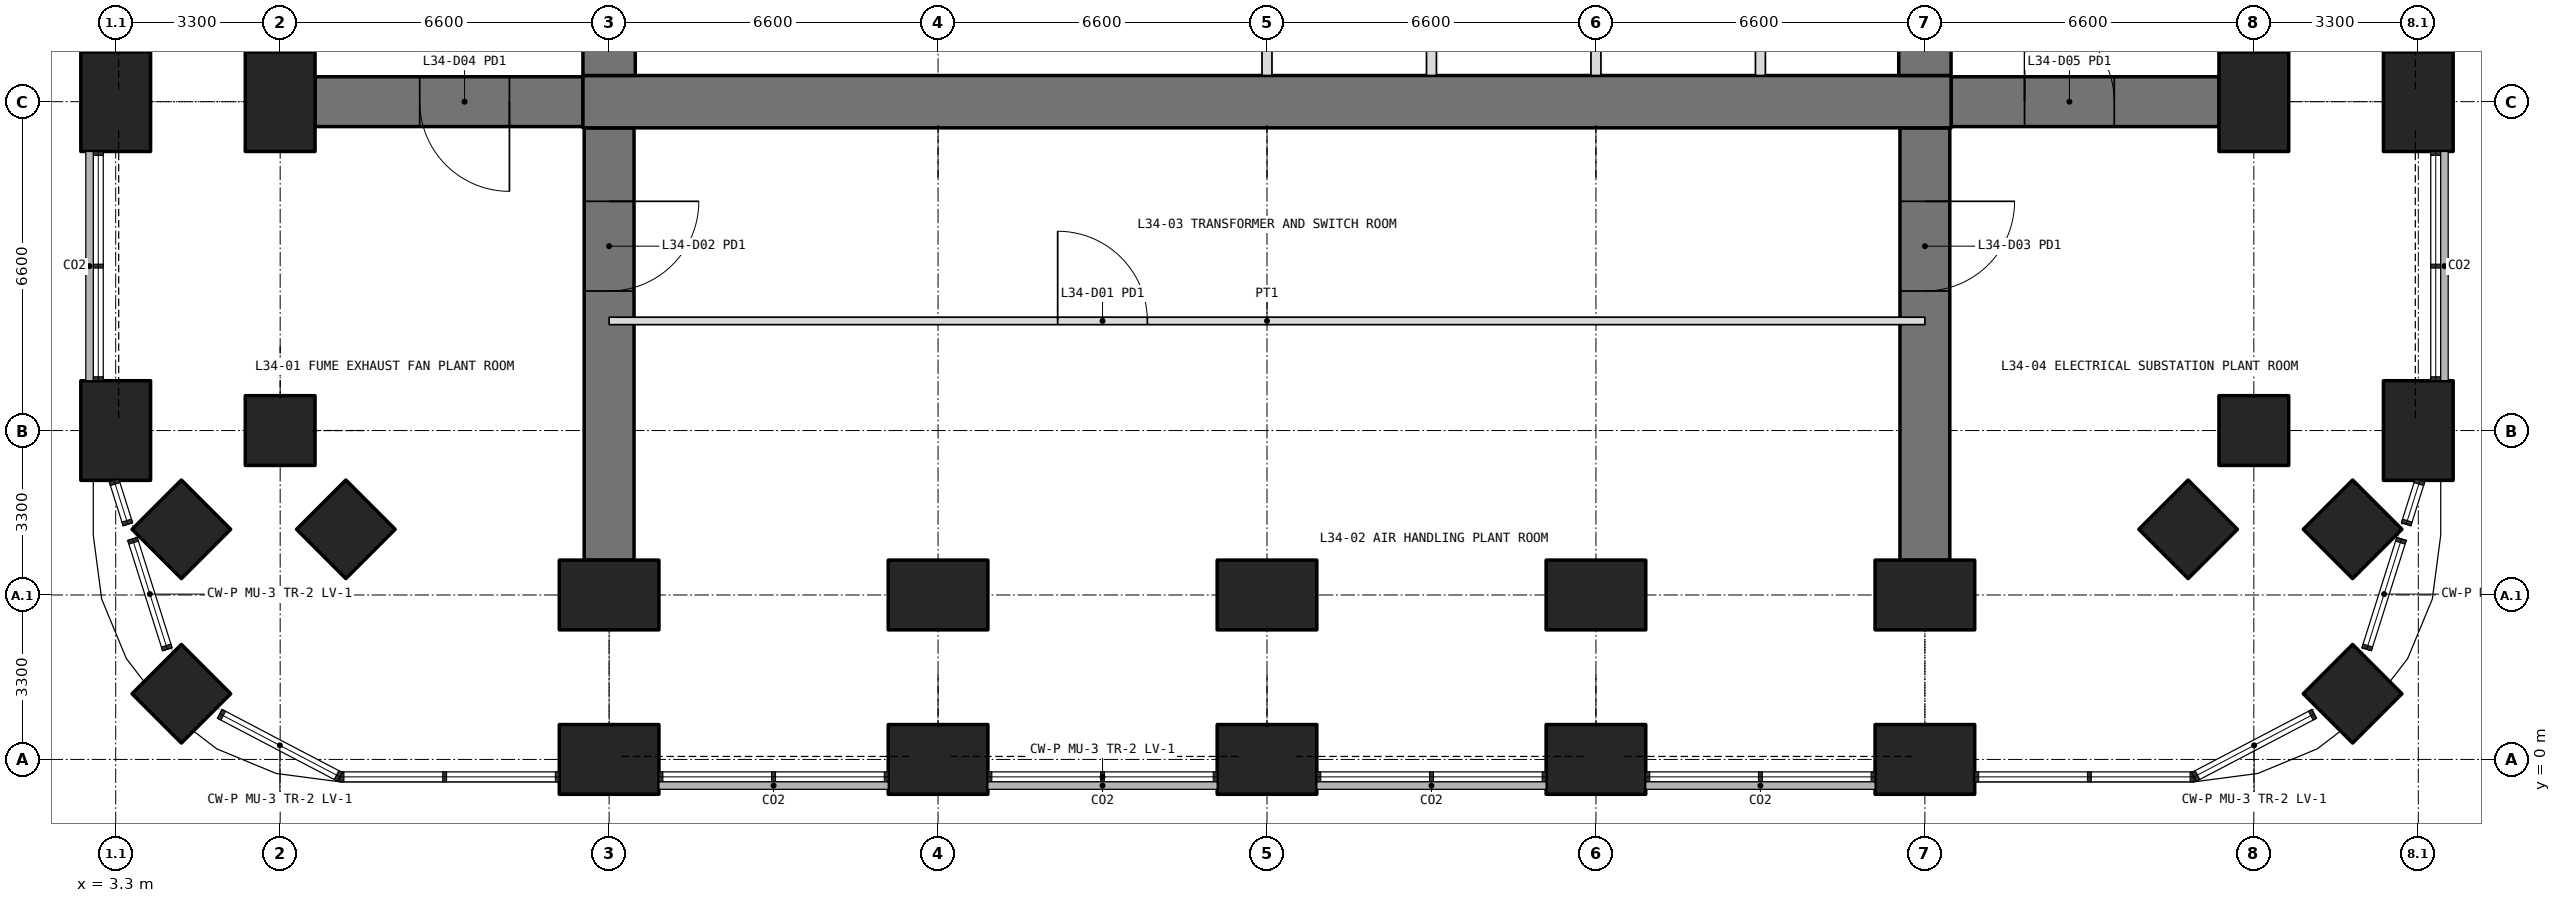
"""IFC4 building model, lengths in metres.
Left out: names, types, materials, properties, quantities, classifications, styles, units other than length and angle.
Written with IfcOpenShell. Run it as: python <this file> out.ifc"""

import sys

from ifc_helpers import new_model, si_unit, direction, frame, frame_2d, origin, origin_2d, place, context, subcontext, project, spatial, rectangle, extrude, element, fill, save


model = new_model("IFC4")
c1 = context("Model", 3, precision=1e-05, world=origin(), true_north=direction((0.0, 1.0)))
c2 = subcontext(c1, "Body", "Model", "MODEL_VIEW")
j1 = project(units=[si_unit("LENGTHUNIT", "METRE"), si_unit("PLANEANGLEUNIT", "RADIAN")], contexts=[c1])
p1 = place(None, origin())
s1 = spatial("IfcSite", under=j1, at=p1, CompositionType="ELEMENT")
p2 = place(p1, origin())
s2 = spatial("IfcBuilding", under=s1, at=p2, CompositionType="ELEMENT")
p3 = place(p2, frame((0.0, 0.0, 149.4)))
s3 = spatial("IfcBuildingStorey", under=s2, at=p3, CompositionType="ELEMENT", Elevation=149.4)
for number, where, z_axis, x_axis in (
    (1, (4.618, 1.318, 0.0), (0.0, 0.0, 1.0), (0.707, 0.707, 0.0)),
    (2, (48.182, 1.318, 0.0), (0.0, 0.0, 1.0), (0.707, 0.707, 0.0)),
):
    element("IfcColumn", number, at=place(p3, frame(where, z_axis=z_axis, x_axis=x_axis)), inside=s3, PredefinedType="COLUMN", context=c2, shape_type="SweptSolid", body=[
        extrude(rectangle(XDim=1.4, YDim=1.4, at=origin_2d()), origin(), (0.0, 0.0, 1.0), 6.3),
    ])
for number, where, z_axis, x_axis in (
    (3, (13.2, 0.0, 0.0), (0.0, 0.0, 1.0), (1.0, 0.0, 0.0)),
    (4, (19.8, 0.0, 0.0), (0.0, 0.0, 1.0), (1.0, 0.0, 0.0)),
    (5, (26.4, 0.0, 0.0), (0.0, 0.0, 1.0), (1.0, 0.0, 0.0)),
    (6, (33.0, 0.0, 0.0), (0.0, 0.0, 1.0), (1.0, 0.0, 0.0)),
    (7, (39.6, 0.0, 0.0), (0.0, 0.0, 1.0), (1.0, 0.0, 0.0)),
    (8, (3.3, 6.6, 0.0), (0.0, 0.0, 1.0), (0.0, 1.0, 0.0)),
    (9, (49.5, 6.6, 0.0), (0.0, 0.0, 1.0), (0.0, 1.0, 0.0)),
    (10, (3.3, 13.2, 0.0), (0.0, 0.0, 1.0), (0.0, 1.0, 0.0)),
    (11, (49.5, 13.2, 0.0), (0.0, 0.0, 1.0), (0.0, 1.0, 0.0)),
):
    element("IfcColumn", number, at=place(p3, frame(where, z_axis=z_axis, x_axis=x_axis)), inside=s3, PredefinedType="COLUMN", context=c2, shape_type="SweptSolid", body=[
        extrude(rectangle(XDim=2.0, YDim=1.4, at=origin_2d()), origin(), (0.0, 0.0, 1.0), 6.3),
    ])
for number, where, z_axis, x_axis in (
    (12, (6.6, 6.6, 0.0), (0.0, 0.0, 1.0), (1.0, 0.0, 0.0)),
    (13, (46.2, 6.6, 0.0), (0.0, 0.0, 1.0), (1.0, 0.0, 0.0)),
    (14, (4.618, 4.618, 0.0), (0.0, 0.0, 1.0), (0.707, 0.707, 0.0)),
    (15, (48.182, 4.618, 0.0), (0.0, 0.0, 1.0), (0.707, 0.707, 0.0)),
):
    element("IfcColumn", number, at=place(p3, frame(where, z_axis=z_axis, x_axis=x_axis)), inside=s3, PredefinedType="COLUMN", context=c2, shape_type="SweptSolid", body=[
        extrude(rectangle(XDim=1.4, YDim=1.4, at=origin_2d()), origin(), (0.0, 0.0, 1.0), 6.3),
    ])
for number, where, z_axis, x_axis in (
    (16, (13.2, 3.3, 0.0), (0.0, 0.0, 1.0), (1.0, 0.0, 0.0)),
    (17, (19.8, 3.3, 0.0), (0.0, 0.0, 1.0), (1.0, 0.0, 0.0)),
    (18, (26.4, 3.3, 0.0), (0.0, 0.0, 1.0), (1.0, 0.0, 0.0)),
    (19, (33.0, 3.3, 0.0), (0.0, 0.0, 1.0), (1.0, 0.0, 0.0)),
    (20, (39.6, 3.3, 0.0), (0.0, 0.0, 1.0), (1.0, 0.0, 0.0)),
):
    element("IfcColumn", number, at=place(p3, frame(where, z_axis=z_axis, x_axis=x_axis)), inside=s3, PredefinedType="COLUMN", context=c2, shape_type="SweptSolid", body=[
        extrude(rectangle(XDim=2.0, YDim=1.4, at=origin_2d()), origin(), (0.0, 0.0, 1.0), 6.3),
    ])
for number, where, z_axis, x_axis in (
    (21, (7.918, 4.618, 0.0), (0.0, 0.0, 1.0), (0.707, 0.707, 0.0)),
    (22, (44.882, 4.618, 0.0), (0.0, 0.0, 1.0), (0.707, 0.707, 0.0)),
):
    element("IfcColumn", number, at=place(p3, frame(where, z_axis=z_axis, x_axis=x_axis)), inside=s3, PredefinedType="COLUMN", context=c2, shape_type="SweptSolid", body=[
        extrude(rectangle(XDim=1.4, YDim=1.4, at=origin_2d()), origin(), (0.0, 0.0, 1.0), 6.3),
    ])
for number, where, z_axis, x_axis in (
    (23, (6.6, 13.2, 0.0), (0.0, 0.0, 1.0), (0.0, 1.0, 0.0)),
    (24, (46.2, 13.2, 0.0), (0.0, 0.0, 1.0), (0.0, 1.0, 0.0)),
):
    element("IfcColumn", number, at=place(p3, frame(where, z_axis=z_axis, x_axis=x_axis)), inside=s3, PredefinedType="COLUMN", context=c2, shape_type="SweptSolid", body=[
        extrude(rectangle(XDim=2.0, YDim=1.4, at=origin_2d()), origin(), (0.0, 0.0, 1.0), 6.3),
    ])
p4 = place(p3, frame((13.2, 12.675, 0.0), z_axis=(0.0, 0.0, 1.0), x_axis=(0.0, -1.0, 0.0)))
e25 = element("IfcWall", 25, at=p4, inside=s3, PredefinedType="SHEAR", context=c2, shape_type="SweptSolid", body=[
    extrude(rectangle(XDim=8.675, YDim=1.0, at=frame_2d((4.337, 0.0))), origin(), (0.0, 0.0, 1.0), 6.0),
])
p5 = place(p4, frame((1.475, 0.0, 0.0)))
e26 = element("IfcOpeningElement", 26, at=p5, cuts=e25, PredefinedType="OPENING", context=c2, shape_type="SweptSolid", body=[
    extrude(rectangle(XDim=1.8, YDim=2.4, at=frame_2d((0.9, 1.2))), frame((0.0, 0.51, 0.0), z_axis=(0.0, -1.0, 0.0), x_axis=(1.0, 0.0, 0.0)), (0.0, 0.0, 1.0), 1.02),
])
p6 = place(p3, frame((39.6, 12.675, 0.0), z_axis=(0.0, 0.0, 1.0), x_axis=(0.0, -1.0, 0.0)))
e27 = element("IfcWall", 27, at=p6, inside=s3, PredefinedType="SHEAR", context=c2, shape_type="SweptSolid", body=[
    extrude(rectangle(XDim=8.675, YDim=1.0, at=frame_2d((4.337, 0.0))), origin(), (0.0, 0.0, 1.0), 6.0),
])
p7 = place(p6, frame((1.475, 0.0, 0.0)))
e28 = element("IfcOpeningElement", 28, at=p7, cuts=e27, PredefinedType="OPENING", context=c2, shape_type="SweptSolid", body=[
    extrude(rectangle(XDim=1.8, YDim=2.4, at=frame_2d((0.9, 1.2))), frame((0.0, 0.51, 0.0), z_axis=(0.0, -1.0, 0.0), x_axis=(1.0, 0.0, 0.0)), (0.0, 0.0, 1.0), 1.02),
])
p8 = place(p3, frame((12.675, 13.2, 0.0), z_axis=(0.0, 0.0, 1.0), x_axis=(-1.0, 0.0, 0.0)))
e29 = element("IfcWall", 29, at=p8, inside=s3, PredefinedType="SHEAR", context=c2, shape_type="SweptSolid", body=[
    extrude(rectangle(XDim=5.375, YDim=1.0, at=frame_2d((2.688, 0.0))), origin(), (0.0, 0.0, 1.0), 6.0),
])
p9 = place(p8, frame((1.475, 0.0, 0.0)))
e30 = element("IfcOpeningElement", 30, at=p9, cuts=e29, PredefinedType="OPENING", context=c2, shape_type="SweptSolid", body=[
    extrude(rectangle(XDim=1.8, YDim=2.4, at=frame_2d((0.9, 1.2))), frame((0.0, 0.51, 0.0), z_axis=(0.0, -1.0, 0.0), x_axis=(1.0, 0.0, 0.0)), (0.0, 0.0, 1.0), 1.02),
])
p10 = place(p3, frame((40.125, 13.2, 0.0), z_axis=(0.0, 0.0, 1.0), x_axis=(1.0, 0.0, 0.0)))
e31 = element("IfcWall", 31, at=p10, inside=s3, PredefinedType="SHEAR", context=c2, shape_type="SweptSolid", body=[
    extrude(rectangle(XDim=5.375, YDim=1.0, at=frame_2d((2.688, 0.0))), origin(), (0.0, 0.0, 1.0), 6.0),
])
p11 = place(p10, frame((1.475, 0.0, 0.0)))
e32 = element("IfcOpeningElement", 32, at=p11, cuts=e31, PredefinedType="OPENING", context=c2, shape_type="SweptSolid", body=[
    extrude(rectangle(XDim=1.8, YDim=2.4, at=frame_2d((0.9, 1.2))), frame((0.0, 0.51, 0.0), z_axis=(0.0, -1.0, 0.0), x_axis=(1.0, 0.0, 0.0)), (0.0, 0.0, 1.0), 1.02),
])
p12 = place(p3, frame((12.675, 13.2, 0.0), z_axis=(0.0, 0.0, 1.0), x_axis=(1.0, 0.0, 0.0)))
e33 = element("IfcWall", 33, at=p12, inside=s3, PredefinedType="SHEAR", context=c2, shape_type="SweptSolid", body=[
    extrude(rectangle(XDim=27.45, YDim=1.05, at=frame_2d((13.725, 0.0))), origin(), (0.0, 0.0, 1.0), 6.3),
])
p13 = place(p3, frame((39.6, 13.725, 0.0), z_axis=(0.0, 0.0, 1.0), x_axis=(0.0, 1.0, 0.0)))
e34 = element("IfcWall", 34, at=p13, inside=s3, PredefinedType="SHEAR", context=c2, shape_type="SweptSolid", body=[
    extrude(rectangle(XDim=18.75, YDim=1.05, at=frame_2d((9.375, 0.0))), origin(), (0.0, 0.0, 1.0), 6.3),
])
p14 = place(p13, frame((3.025, 0.0, 0.0)))
e35 = element("IfcOpeningElement", 35, at=p14, cuts=e34, PredefinedType="OPENING", context=c2, shape_type="SweptSolid", body=[
    extrude(rectangle(XDim=1.6, YDim=2.1, at=frame_2d((0.8, 1.05))), frame((0.0, 0.535, 0.0), z_axis=(0.0, -1.0, 0.0), x_axis=(1.0, 0.0, 0.0)), (0.0, 0.0, 1.0), 1.07),
])
p15 = place(p13, frame((13.825, 0.0, 0.0)))
e36 = element("IfcOpeningElement", 36, at=p15, cuts=e34, PredefinedType="OPENING", context=c2, shape_type="SweptSolid", body=[
    extrude(rectangle(XDim=1.6, YDim=2.1, at=frame_2d((0.8, 1.05))), frame((0.0, 0.535, 0.0), z_axis=(0.0, -1.0, 0.0), x_axis=(1.0, 0.0, 0.0)), (0.0, 0.0, 1.0), 1.07),
])
p16 = place(p3, frame((13.2, 32.475, 0.0), z_axis=(0.0, 0.0, 1.0), x_axis=(0.0, -1.0, 0.0)))
e37 = element("IfcWall", 37, at=p16, inside=s3, PredefinedType="SHEAR", context=c2, shape_type="SweptSolid", body=[
    extrude(rectangle(XDim=18.75, YDim=1.05, at=frame_2d((9.375, 0.0))), origin(), (0.0, 0.0, 1.0), 6.3),
])
p17 = place(p16, frame((14.125, 0.0, 0.0)))
e38 = element("IfcOpeningElement", 38, at=p17, cuts=e37, PredefinedType="OPENING", context=c2, shape_type="SweptSolid", body=[
    extrude(rectangle(XDim=1.6, YDim=2.1, at=frame_2d((0.8, 1.05))), frame((0.0, 0.535, 0.0), z_axis=(0.0, -1.0, 0.0), x_axis=(1.0, 0.0, 0.0)), (0.0, 0.0, 1.0), 1.07),
])
p18 = place(p16, frame((3.325, 0.0, 0.0)))
e39 = element("IfcOpeningElement", 39, at=p18, cuts=e37, PredefinedType="OPENING", context=c2, shape_type="SweptSolid", body=[
    extrude(rectangle(XDim=1.6, YDim=2.1, at=frame_2d((0.8, 1.05))), frame((0.0, 0.535, 0.0), z_axis=(0.0, -1.0, 0.0), x_axis=(1.0, 0.0, 0.0)), (0.0, 0.0, 1.0), 1.07),
])
for number, where, z_axis, x_axis in (
    (40, (26.4, 13.725, 0.0), (0.0, 0.0, 1.0), (0.0, 1.0, 0.0)),
    (41, (29.7, 13.725, 0.0), (0.0, 0.0, 1.0), (0.0, 1.0, 0.0)),
    (42, (33.0, 13.725, 0.0), (0.0, 0.0, 1.0), (0.0, 1.0, 0.0)),
    (43, (36.3, 13.725, 0.0), (0.0, 0.0, 1.0), (0.0, 1.0, 0.0)),
):
    element("IfcWall", number, at=place(p3, frame(where, z_axis=z_axis, x_axis=x_axis)), inside=s3, PredefinedType="PARTITIONING", context=c2, shape_type="SweptSolid", body=[
        extrude(rectangle(XDim=1.975, YDim=0.2, at=frame_2d((0.987, 0.0))), origin(), (0.0, 0.0, 1.0), 6.3),
    ])
p19 = place(p3, frame((13.2, 8.8, 0.0), z_axis=(0.0, 0.0, 1.0), x_axis=(1.0, 0.0, 0.0)))
e44 = element("IfcWall", 44, at=p19, inside=s3, PredefinedType="PARTITIONING", context=c2, shape_type="SweptSolid", body=[
    extrude(rectangle(XDim=26.4, YDim=0.15, at=frame_2d((13.2, 0.0))), origin(), (0.0, 0.0, 1.0), 4.0),
])
p20 = place(p19, frame((9.0, 0.0, 0.0)))
e45 = element("IfcOpeningElement", 45, at=p20, cuts=e44, PredefinedType="OPENING", context=c2, shape_type="SweptSolid", body=[
    extrude(rectangle(XDim=1.8, YDim=2.4, at=frame_2d((0.9, 1.2))), frame((0.0, 0.085, 0.0), z_axis=(0.0, -1.0, 0.0), x_axis=(1.0, 0.0, 0.0)), (0.0, 0.0, 1.0), 0.17),
])
p21 = place(p20, origin())
e46 = element("IfcDoor", 46, at=p21, inside=s3, OperationType="DOUBLE_DOOR_SINGLE_SWING", PredefinedType="DOOR", context=c2, shape_type="SweptSolid", body=[
    extrude(rectangle(XDim=1.8, YDim=2.4, at=frame_2d((0.9, 1.2))), frame((0.0, 0.025, 0.0), z_axis=(0.0, -1.0, 0.0), x_axis=(1.0, 0.0, 0.0)), (0.0, 0.0, 1.0), 0.05),
])
fill(e45, e46)
p22 = place(p5, origin())
e47 = element("IfcDoor", 47, at=p22, inside=s3, OperationType="DOUBLE_DOOR_SINGLE_SWING", PredefinedType="DOOR", context=c2, shape_type="SweptSolid", body=[
    extrude(rectangle(XDim=1.8, YDim=2.4, at=frame_2d((0.9, 1.2))), frame((0.0, 0.025, 0.0), z_axis=(0.0, -1.0, 0.0), x_axis=(1.0, 0.0, 0.0)), (0.0, 0.0, 1.0), 0.05),
])
fill(e26, e47)
p23 = place(p7, origin())
e48 = element("IfcDoor", 48, at=p23, inside=s3, OperationType="DOUBLE_DOOR_SINGLE_SWING", PredefinedType="DOOR", context=c2, shape_type="SweptSolid", body=[
    extrude(rectangle(XDim=1.8, YDim=2.4, at=frame_2d((0.9, 1.2))), frame((0.0, 0.025, 0.0), z_axis=(0.0, -1.0, 0.0), x_axis=(1.0, 0.0, 0.0)), (0.0, 0.0, 1.0), 0.05),
])
fill(e28, e48)
p24 = place(p9, origin())
e49 = element("IfcDoor", 49, at=p24, inside=s3, OperationType="DOUBLE_DOOR_SINGLE_SWING", PredefinedType="DOOR", context=c2, shape_type="SweptSolid", body=[
    extrude(rectangle(XDim=1.8, YDim=2.4, at=frame_2d((0.9, 1.2))), frame((0.0, 0.025, 0.0), z_axis=(0.0, -1.0, 0.0), x_axis=(1.0, 0.0, 0.0)), (0.0, 0.0, 1.0), 0.05),
])
fill(e30, e49)
p25 = place(p11, origin())
e50 = element("IfcDoor", 50, at=p25, inside=s3, OperationType="DOUBLE_DOOR_SINGLE_SWING", PredefinedType="DOOR", context=c2, shape_type="SweptSolid", body=[
    extrude(rectangle(XDim=1.8, YDim=2.4, at=frame_2d((0.9, 1.2))), frame((0.0, 0.025, 0.0), z_axis=(0.0, -1.0, 0.0), x_axis=(1.0, 0.0, 0.0)), (0.0, 0.0, 1.0), 0.05),
])
fill(e32, e50)
save(model, sys.argv[1])
